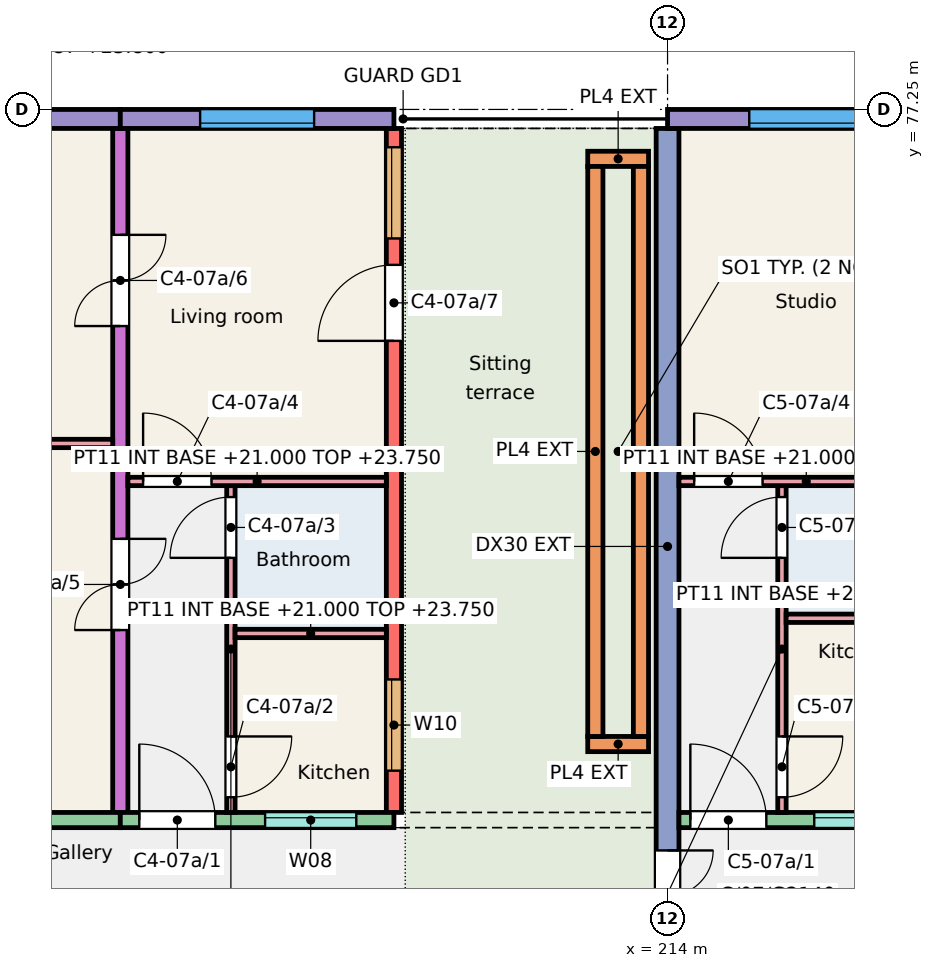
"""IFC4 building model, lengths in metres.
Left out: names, types, materials, properties, quantities, classifications, styles, units other than length and angle.
Written with IfcOpenShell. Run it as: python <this file> out.ifc"""

import sys

from ifc_helpers import new_model, si_unit, direction, frame, frame_2d, origin, place, context, subcontext, project, spatial, rectangle, extrude, element, fill, save


model = new_model("IFC4")
c1 = context("Model", 3, precision=1e-05, world=origin(), true_north=direction((0.0, 1.0)))
c2 = subcontext(c1, "Body", "Model", "MODEL_VIEW")
j1 = project(units=[si_unit("LENGTHUNIT", "METRE"), si_unit("PLANEANGLEUNIT", "RADIAN")], contexts=[c1])
p1 = place(None, origin())
s1 = spatial("IfcSite", under=j1, at=p1, CompositionType="ELEMENT")
p2 = place(p1, origin())
s2 = spatial("IfcBuilding", under=s1, at=p2, CompositionType="ELEMENT")
p3 = place(p2, frame((0.0, 0.0, 21.0)))
s3 = spatial("IfcBuildingStorey", under=s2, at=p3, CompositionType="ELEMENT", Elevation=21.0)
p4 = place(p3, frame((206.8, 68.0, 0.0), z_axis=(0.0, 0.0, 1.0), x_axis=(0.0, 1.0, 0.0)))
e1 = element("IfcWall", 1, at=p4, inside=s3, PredefinedType="SHEAR", context=c2, shape_type="SweptSolid", body=[
    extrude(rectangle(XDim=9.0, YDim=0.2, at=frame_2d((4.5, 0.0))), origin(), (0.0, 0.0, 1.0), 3.0),
])
p5 = place(p4, frame((2.4, 0.0, 0.0)))
e2 = element("IfcOpeningElement", 2, at=p5, cuts=e1, PredefinedType="OPENING", context=c2, shape_type="SweptSolid", body=[
    extrude(rectangle(XDim=1.2, YDim=2.1, at=frame_2d((0.6, 1.05))), frame((0.0, 0.11, 0.0), z_axis=(0.0, -1.0, 0.0), x_axis=(1.0, 0.0, 0.0)), (0.0, 0.0, 1.0), 0.22),
])
p6 = place(p4, frame((6.4, 0.0, 0.0)))
e3 = element("IfcOpeningElement", 3, at=p6, cuts=e1, PredefinedType="OPENING", context=c2, shape_type="SweptSolid", body=[
    extrude(rectangle(XDim=1.2, YDim=2.1, at=frame_2d((0.6, 1.05))), frame((0.0, 0.11, 0.0), z_axis=(0.0, -1.0, 0.0), x_axis=(1.0, 0.0, 0.0)), (0.0, 0.0, 1.0), 0.22),
])
p7 = place(p3, frame((210.4, 68.0, 0.0), z_axis=(0.0, 0.0, 1.0), x_axis=(0.0, 1.0, 0.0)))
e4 = element("IfcWall", 4, at=p7, inside=s3, PredefinedType="SHEAR", context=c2, shape_type="SweptSolid", body=[
    extrude(rectangle(XDim=9.0, YDim=0.2, at=frame_2d((4.5, 0.0))), origin(), (0.0, 0.0, 1.0), 3.0),
])
p8 = place(p7, frame((0.55, 0.0, 0.9)))
e5 = element("IfcOpeningElement", 5, at=p8, cuts=e4, PredefinedType="OPENING", context=c2, shape_type="SweptSolid", body=[
    extrude(rectangle(XDim=1.2, YDim=1.5, at=frame_2d((0.6, 0.75))), frame((0.0, 0.11, 0.0), z_axis=(0.0, -1.0, 0.0), x_axis=(1.0, 0.0, 0.0)), (0.0, 0.0, 1.0), 0.22),
])
p9 = place(p7, frame((7.552, 0.0, 0.9)))
e6 = element("IfcOpeningElement", 6, at=p9, cuts=e4, PredefinedType="OPENING", context=c2, shape_type="SweptSolid", body=[
    extrude(rectangle(XDim=1.2, YDim=1.5, at=frame_2d((0.6, 0.75))), frame((0.0, 0.11, 0.0), z_axis=(0.0, -1.0, 0.0), x_axis=(1.0, 0.0, 0.0)), (0.0, 0.0, 1.0), 0.22),
])
p10 = place(p7, frame((6.205, 0.0, 0.0)))
e7 = element("IfcOpeningElement", 7, at=p10, cuts=e4, PredefinedType="OPENING", context=c2, shape_type="SweptSolid", body=[
    extrude(rectangle(XDim=1.0, YDim=2.1, at=frame_2d((0.5, 1.05))), frame((0.0, 0.11, 0.0), z_axis=(0.0, -1.0, 0.0), x_axis=(1.0, 0.0, 0.0)), (0.0, 0.0, 1.0), 0.22),
])
p11 = place(p3, frame((214.0, 66.0, 0.0), z_axis=(0.0, 0.0, 1.0), x_axis=(0.0, 1.0, 0.0)))
e8 = element("IfcWall", 8, at=p11, inside=s3, PredefinedType="SHEAR", context=c2, shape_type="SweptSolid", body=[
    extrude(rectangle(XDim=11.0, YDim=0.3, at=frame_2d((5.5, 0.0))), origin(), (0.0, 0.0, 1.0), 3.0),
])
p12 = place(p11, frame((0.3, 0.0, 0.0)))
e9 = element("IfcOpeningElement", 9, at=p12, cuts=e8, PredefinedType="OPENING", context=c2, shape_type="SweptSolid", body=[
    extrude(rectangle(XDim=1.2, YDim=2.1, at=frame_2d((0.6, 1.05))), frame((0.0, 0.16, 0.0), z_axis=(0.0, -1.0, 0.0), x_axis=(1.0, 0.0, 0.0)), (0.0, 0.0, 1.0), 0.32),
])
p13 = place(p3, frame((203.2, 77.125, 0.0), z_axis=(0.0, 0.0, 1.0), x_axis=(1.0, 0.0, 0.0)))
e10 = element("IfcWall", 10, at=p13, inside=s3, PredefinedType="SOLIDWALL", context=c2, shape_type="SweptSolid", body=[
    extrude(rectangle(XDim=3.6, YDim=0.25, at=frame_2d((1.8, 0.0))), origin(), (0.0, 0.0, 1.0), 3.0),
])
p14 = place(p13, frame((1.062, 0.0, 0.9)))
e11 = element("IfcOpeningElement", 11, at=p14, cuts=e10, PredefinedType="OPENING", context=c2, shape_type="SweptSolid", body=[
    extrude(rectangle(XDim=1.5, YDim=1.5, at=frame_2d((0.75, 0.75))), frame((0.0, 0.135, 0.0), z_axis=(0.0, -1.0, 0.0), x_axis=(1.0, 0.0, 0.0)), (0.0, 0.0, 1.0), 0.27),
])
p15 = place(p3, frame((203.2, 67.9, 0.0), z_axis=(0.0, 0.0, 1.0), x_axis=(1.0, 0.0, 0.0)))
e12 = element("IfcWall", 12, at=p15, inside=s3, PredefinedType="SOLIDWALL", context=c2, shape_type="SweptSolid", body=[
    extrude(rectangle(XDim=3.6, YDim=0.2, at=frame_2d((1.8, 0.0))), origin(), (0.0, 0.0, 1.0), 3.0),
])
p16 = place(p15, frame((1.062, 0.0, 0.9)))
e13 = element("IfcOpeningElement", 13, at=p16, cuts=e12, PredefinedType="OPENING", context=c2, shape_type="SweptSolid", body=[
    extrude(rectangle(XDim=1.5, YDim=1.5, at=frame_2d((0.75, 0.75))), frame((0.0, 0.11, 0.0), z_axis=(0.0, -1.0, 0.0), x_axis=(1.0, 0.0, 0.0)), (0.0, 0.0, 1.0), 0.22),
])
p17 = place(p3, frame((206.8, 77.125, 0.0), z_axis=(0.0, 0.0, 1.0), x_axis=(1.0, 0.0, 0.0)))
e14 = element("IfcWall", 14, at=p17, inside=s3, PredefinedType="SOLIDWALL", context=c2, shape_type="SweptSolid", body=[
    extrude(rectangle(XDim=3.6, YDim=0.25, at=frame_2d((1.8, 0.0))), origin(), (0.0, 0.0, 1.0), 3.0),
])
p18 = place(p17, frame((1.05, 0.0, 0.9)))
e15 = element("IfcOpeningElement", 15, at=p18, cuts=e14, PredefinedType="OPENING", context=c2, shape_type="SweptSolid", body=[
    extrude(rectangle(XDim=1.5, YDim=1.5, at=frame_2d((0.75, 0.75))), frame((0.0, 0.135, 0.0), z_axis=(0.0, -1.0, 0.0), x_axis=(1.0, 0.0, 0.0)), (0.0, 0.0, 1.0), 0.27),
])
p19 = place(p3, frame((206.8, 67.9, 0.0), z_axis=(0.0, 0.0, 1.0), x_axis=(1.0, 0.0, 0.0)))
e16 = element("IfcWall", 16, at=p19, inside=s3, PredefinedType="SOLIDWALL", context=c2, shape_type="SweptSolid", body=[
    extrude(rectangle(XDim=3.6, YDim=0.2, at=frame_2d((1.8, 0.0))), origin(), (0.0, 0.0, 1.0), 3.0),
])
p20 = place(p19, frame((1.905, 0.0, 1.1)))
e17 = element("IfcOpeningElement", 17, at=p20, cuts=e16, PredefinedType="OPENING", context=c2, shape_type="SweptSolid", body=[
    extrude(rectangle(XDim=1.2, YDim=1.3, at=frame_2d((0.6, 0.65))), frame((0.0, 0.11, 0.0), z_axis=(0.0, -1.0, 0.0), x_axis=(1.0, 0.0, 0.0)), (0.0, 0.0, 1.0), 0.22),
])
p21 = place(p19, frame((0.25, 0.0, 0.0)))
e18 = element("IfcOpeningElement", 18, at=p21, cuts=e16, PredefinedType="OPENING", context=c2, shape_type="SweptSolid", body=[
    extrude(rectangle(XDim=1.0, YDim=2.1, at=frame_2d((0.5, 1.05))), frame((0.0, 0.11, 0.0), z_axis=(0.0, -1.0, 0.0), x_axis=(1.0, 0.0, 0.0)), (0.0, 0.0, 1.0), 0.22),
])
p22 = place(p3, frame((214.0, 77.125, 0.0), z_axis=(0.0, 0.0, 1.0), x_axis=(1.0, 0.0, 0.0)))
e19 = element("IfcWall", 19, at=p22, inside=s3, PredefinedType="SOLIDWALL", context=c2, shape_type="SweptSolid", body=[
    extrude(rectangle(XDim=3.6, YDim=0.25, at=frame_2d((1.8, 0.0))), origin(), (0.0, 0.0, 1.0), 3.0),
])
p23 = place(p22, frame((1.075, 0.0, 0.9)))
e20 = element("IfcOpeningElement", 20, at=p23, cuts=e19, PredefinedType="OPENING", context=c2, shape_type="SweptSolid", body=[
    extrude(rectangle(XDim=1.5, YDim=1.5, at=frame_2d((0.75, 0.75))), frame((0.0, 0.135, 0.0), z_axis=(0.0, -1.0, 0.0), x_axis=(1.0, 0.0, 0.0)), (0.0, 0.0, 1.0), 0.27),
])
p24 = place(p3, frame((214.15, 67.9, 0.0), z_axis=(0.0, 0.0, 1.0), x_axis=(1.0, 0.0, 0.0)))
e21 = element("IfcWall", 21, at=p24, inside=s3, PredefinedType="SOLIDWALL", context=c2, shape_type="SweptSolid", body=[
    extrude(rectangle(XDim=3.45, YDim=0.2, at=frame_2d((1.725, 0.0))), origin(), (0.0, 0.0, 1.0), 3.0),
])
p25 = place(p24, frame((1.78, 0.0, 1.1)))
e22 = element("IfcOpeningElement", 22, at=p25, cuts=e21, PredefinedType="OPENING", context=c2, shape_type="SweptSolid", body=[
    extrude(rectangle(XDim=1.2, YDim=1.3, at=frame_2d((0.6, 0.65))), frame((0.0, 0.11, 0.0), z_axis=(0.0, -1.0, 0.0), x_axis=(1.0, 0.0, 0.0)), (0.0, 0.0, 1.0), 0.22),
])
p26 = place(p24, frame((0.15, 0.0, 0.0)))
e23 = element("IfcOpeningElement", 23, at=p26, cuts=e21, PredefinedType="OPENING", context=c2, shape_type="SweptSolid", body=[
    extrude(rectangle(XDim=1.0, YDim=2.1, at=frame_2d((0.5, 1.05))), frame((0.0, 0.11, 0.0), z_axis=(0.0, -1.0, 0.0), x_axis=(1.0, 0.0, 0.0)), (0.0, 0.0, 1.0), 0.22),
])
for number, where, z_axis, x_axis in (
    (24, (212.95, 68.9, 0.01), (0.0, 0.0, 1.0), (1.0, 0.0, 0.0)),
    (25, (212.95, 76.6, 0.01), (0.0, 0.0, 1.0), (1.0, 0.0, 0.0)),
):
    element("IfcWall", number, at=place(p3, frame(where, z_axis=z_axis, x_axis=x_axis)), inside=s3, PredefinedType="SOLIDWALL", context=c2, shape_type="SweptSolid", body=[
        extrude(rectangle(XDim=0.8, YDim=0.2, at=frame_2d((0.4, 0.0))), origin(), (0.0, 0.0, 1.0), 0.45),
    ])
for number, where, z_axis, x_axis in (
    (26, (213.05, 69.0, 0.01), (0.0, 0.0, 1.0), (0.0, 1.0, 0.0)),
    (27, (213.65, 69.0, 0.01), (0.0, 0.0, 1.0), (0.0, 1.0, 0.0)),
):
    element("IfcWall", number, at=place(p3, frame(where, z_axis=z_axis, x_axis=x_axis)), inside=s3, PredefinedType="SOLIDWALL", context=c2, shape_type="SweptSolid", body=[
        extrude(rectangle(XDim=7.5, YDim=0.2, at=frame_2d((3.75, 0.0))), origin(), (0.0, 0.0, 1.0), 0.45),
    ])
p27 = place(p3, frame((208.255, 68.0, 0.0), z_axis=(0.0, 0.0, 1.0), x_axis=(0.0, 1.0, 0.0)))
e28 = element("IfcWall", 28, at=p27, inside=s3, PredefinedType="PARTITIONING", context=c2, shape_type="SweptSolid", body=[
    extrude(rectangle(XDim=4.3, YDim=0.11, at=frame_2d((2.15, 0.0))), origin(), (0.0, 0.0, 1.0), 2.75),
])
p28 = place(p27, frame((0.2, 0.0, 0.0)))
e29 = element("IfcOpeningElement", 29, at=p28, cuts=e28, PredefinedType="OPENING", context=c2, shape_type="SweptSolid", body=[
    extrude(rectangle(XDim=0.8, YDim=2.1, at=frame_2d((0.4, 1.05))), frame((0.0, 0.065, 0.0), z_axis=(0.0, -1.0, 0.0), x_axis=(1.0, 0.0, 0.0)), (0.0, 0.0, 1.0), 0.13),
])
p29 = place(p27, frame((3.35, 0.0, 0.0)))
e30 = element("IfcOpeningElement", 30, at=p29, cuts=e28, PredefinedType="OPENING", context=c2, shape_type="SweptSolid", body=[
    extrude(rectangle(XDim=0.8, YDim=2.1, at=frame_2d((0.4, 1.05))), frame((0.0, 0.065, 0.0), z_axis=(0.0, -1.0, 0.0), x_axis=(1.0, 0.0, 0.0)), (0.0, 0.0, 1.0), 0.13),
])
p30 = place(p3, frame((208.31, 70.355, 0.0), z_axis=(0.0, 0.0, 1.0), x_axis=(1.0, 0.0, 0.0)))
e31 = element("IfcWall", 31, at=p30, inside=s3, PredefinedType="PARTITIONING", context=c2, shape_type="SweptSolid", body=[
    extrude(rectangle(XDim=1.99, YDim=0.11, at=frame_2d((0.995, 0.0))), origin(), (0.0, 0.0, 1.0), 2.75),
])
p31 = place(p3, frame((206.9, 72.355, 0.0), z_axis=(0.0, 0.0, 1.0), x_axis=(1.0, 0.0, 0.0)))
e32 = element("IfcWall", 32, at=p31, inside=s3, PredefinedType="PARTITIONING", context=c2, shape_type="SweptSolid", body=[
    extrude(rectangle(XDim=3.4, YDim=0.11, at=frame_2d((1.7, 0.0))), origin(), (0.0, 0.0, 1.0), 2.75),
])
p32 = place(p31, frame((0.2, 0.0, 0.0)))
e33 = element("IfcOpeningElement", 33, at=p32, cuts=e32, PredefinedType="OPENING", context=c2, shape_type="SweptSolid", body=[
    extrude(rectangle(XDim=0.9, YDim=2.1, at=frame_2d((0.45, 1.05))), frame((0.0, 0.065, 0.0), z_axis=(0.0, -1.0, 0.0), x_axis=(1.0, 0.0, 0.0)), (0.0, 0.0, 1.0), 0.13),
])
p33 = place(p3, frame((203.325, 72.855, 0.0), z_axis=(0.0, 0.0, 1.0), x_axis=(1.0, 0.0, 0.0)))
e34 = element("IfcWall", 34, at=p33, inside=s3, PredefinedType="PARTITIONING", context=c2, shape_type="SweptSolid", body=[
    extrude(rectangle(XDim=3.375, YDim=0.11, at=frame_2d((1.688, 0.0))), origin(), (0.0, 0.0, 1.0), 2.8),
])
p34 = place(p3, frame((215.505, 68.0, 0.0), z_axis=(0.0, 0.0, 1.0), x_axis=(0.0, 1.0, 0.0)))
e35 = element("IfcWall", 35, at=p34, inside=s3, PredefinedType="PARTITIONING", context=c2, shape_type="SweptSolid", body=[
    extrude(rectangle(XDim=4.3, YDim=0.11, at=frame_2d((2.15, 0.0))), origin(), (0.0, 0.0, 1.0), 2.8),
])
p35 = place(p34, frame((0.2, 0.0, 0.0)))
e36 = element("IfcOpeningElement", 36, at=p35, cuts=e35, PredefinedType="OPENING", context=c2, shape_type="SweptSolid", body=[
    extrude(rectangle(XDim=0.8, YDim=2.1, at=frame_2d((0.4, 1.05))), frame((0.0, 0.065, 0.0), z_axis=(0.0, -1.0, 0.0), x_axis=(1.0, 0.0, 0.0)), (0.0, 0.0, 1.0), 0.13),
])
p36 = place(p34, frame((3.35, 0.0, 0.0)))
e37 = element("IfcOpeningElement", 37, at=p36, cuts=e35, PredefinedType="OPENING", context=c2, shape_type="SweptSolid", body=[
    extrude(rectangle(XDim=0.8, YDim=2.1, at=frame_2d((0.4, 1.05))), frame((0.0, 0.065, 0.0), z_axis=(0.0, -1.0, 0.0), x_axis=(1.0, 0.0, 0.0)), (0.0, 0.0, 1.0), 0.13),
])
p37 = place(p3, frame((215.56, 70.555, 0.0), z_axis=(0.0, 0.0, 1.0), x_axis=(1.0, 0.0, 0.0)))
e38 = element("IfcWall", 38, at=p37, inside=s3, PredefinedType="PARTITIONING", context=c2, shape_type="SweptSolid", body=[
    extrude(rectangle(XDim=1.94, YDim=0.11, at=frame_2d((0.97, 0.0))), origin(), (0.0, 0.0, 1.0), 2.8),
])
p38 = place(p3, frame((214.15, 72.355, 0.0), z_axis=(0.0, 0.0, 1.0), x_axis=(1.0, 0.0, 0.0)))
e39 = element("IfcWall", 39, at=p38, inside=s3, PredefinedType="PARTITIONING", context=c2, shape_type="SweptSolid", body=[
    extrude(rectangle(XDim=3.35, YDim=0.11, at=frame_2d((1.675, 0.0))), origin(), (0.0, 0.0, 1.0), 2.8),
])
p39 = place(p38, frame((0.2, 0.0, 0.0)))
e40 = element("IfcOpeningElement", 40, at=p39, cuts=e39, PredefinedType="OPENING", context=c2, shape_type="SweptSolid", body=[
    extrude(rectangle(XDim=0.9, YDim=2.1, at=frame_2d((0.45, 1.05))), frame((0.0, 0.065, 0.0), z_axis=(0.0, -1.0, 0.0), x_axis=(1.0, 0.0, 0.0)), (0.0, 0.0, 1.0), 0.13),
])
p40 = place(p20, origin())
e41 = element("IfcWindow", 41, at=p40, inside=s3, PartitioningType="SINGLE_PANEL", PredefinedType="WINDOW", context=c2, shape_type="SweptSolid", body=[
    extrude(rectangle(XDim=1.2, YDim=1.3, at=frame_2d((0.6, 0.65))), frame((0.0, 0.06, 0.0), z_axis=(0.0, -1.0, 0.0), x_axis=(1.0, 0.0, 0.0)), (0.0, 0.0, 1.0), 0.06),
])
fill(e17, e41)
p41 = place(p18, origin())
e42 = element("IfcWindow", 42, at=p41, inside=s3, PartitioningType="SINGLE_PANEL", PredefinedType="WINDOW", context=c2, shape_type="SweptSolid", body=[
    extrude(rectangle(XDim=1.5, YDim=1.5, at=frame_2d((0.75, 0.75))), frame((0.0, -0.025, 0.0), z_axis=(0.0, -1.0, 0.0), x_axis=(1.0, 0.0, 0.0)), (0.0, 0.0, 1.0), 0.06),
])
fill(e15, e42)
p42 = place(p8, origin())
e43 = element("IfcWindow", 43, at=p42, inside=s3, PartitioningType="SINGLE_PANEL", PredefinedType="WINDOW", context=c2, shape_type="SweptSolid", body=[
    extrude(rectangle(XDim=1.2, YDim=1.5, at=frame_2d((0.6, 0.75))), frame((0.0, 0.06, 0.0), z_axis=(0.0, -1.0, 0.0), x_axis=(1.0, 0.0, 0.0)), (0.0, 0.0, 1.0), 0.06),
])
fill(e5, e43)
p43 = place(p9, origin())
e44 = element("IfcWindow", 44, at=p43, inside=s3, PartitioningType="SINGLE_PANEL", PredefinedType="WINDOW", context=c2, shape_type="SweptSolid", body=[
    extrude(rectangle(XDim=1.2, YDim=1.5, at=frame_2d((0.6, 0.75))), frame((0.0, 0.06, 0.0), z_axis=(0.0, -1.0, 0.0), x_axis=(1.0, 0.0, 0.0)), (0.0, 0.0, 1.0), 0.06),
])
fill(e6, e44)
p44 = place(p25, origin())
e45 = element("IfcWindow", 45, at=p44, inside=s3, PartitioningType="SINGLE_PANEL", PredefinedType="WINDOW", context=c2, shape_type="SweptSolid", body=[
    extrude(rectangle(XDim=1.2, YDim=1.3, at=frame_2d((0.6, 0.65))), frame((0.0, 0.06, 0.0), z_axis=(0.0, -1.0, 0.0), x_axis=(1.0, 0.0, 0.0)), (0.0, 0.0, 1.0), 0.06),
])
fill(e22, e45)
p45 = place(p23, origin())
e46 = element("IfcWindow", 46, at=p45, inside=s3, PartitioningType="SINGLE_PANEL", PredefinedType="WINDOW", context=c2, shape_type="SweptSolid", body=[
    extrude(rectangle(XDim=1.5, YDim=1.5, at=frame_2d((0.75, 0.75))), frame((0.0, -0.025, 0.0), z_axis=(0.0, -1.0, 0.0), x_axis=(1.0, 0.0, 0.0)), (0.0, 0.0, 1.0), 0.06),
])
fill(e20, e46)
p46 = place(p21, origin())
e47 = element("IfcDoor", 47, at=p46, inside=s3, OperationType="SINGLE_SWING_LEFT", PredefinedType="DOOR", context=c2, shape_type="SweptSolid", body=[
    extrude(rectangle(XDim=1.0, YDim=2.1, at=frame_2d((0.5, 1.05))), frame((0.0, 0.025, 0.0), z_axis=(0.0, -1.0, 0.0), x_axis=(1.0, 0.0, 0.0)), (0.0, 0.0, 1.0), 0.05),
])
fill(e18, e47)
p47 = place(p28, origin())
e48 = element("IfcDoor", 48, at=p47, inside=s3, OperationType="SINGLE_SWING_RIGHT", PredefinedType="DOOR", context=c2, shape_type="SweptSolid", body=[
    extrude(rectangle(XDim=0.8, YDim=2.1, at=frame_2d((0.4, 1.05))), frame((0.0, 0.025, 0.0), z_axis=(0.0, -1.0, 0.0), x_axis=(1.0, 0.0, 0.0)), (0.0, 0.0, 1.0), 0.05),
])
fill(e29, e48)
p48 = place(p29, origin())
e49 = element("IfcDoor", 49, at=p48, inside=s3, OperationType="SINGLE_SWING_LEFT", PredefinedType="DOOR", context=c2, shape_type="SweptSolid", body=[
    extrude(rectangle(XDim=0.8, YDim=2.1, at=frame_2d((0.4, 1.05))), frame((0.0, 0.025, 0.0), z_axis=(0.0, -1.0, 0.0), x_axis=(1.0, 0.0, 0.0)), (0.0, 0.0, 1.0), 0.05),
])
fill(e30, e49)
p49 = place(p32, origin())
e50 = element("IfcDoor", 50, at=p49, inside=s3, OperationType="SINGLE_SWING_LEFT", PredefinedType="DOOR", context=c2, shape_type="SweptSolid", body=[
    extrude(rectangle(XDim=0.9, YDim=2.1, at=frame_2d((0.45, 1.05))), frame((0.0, 0.025, 0.0), z_axis=(0.0, -1.0, 0.0), x_axis=(1.0, 0.0, 0.0)), (0.0, 0.0, 1.0), 0.05),
])
fill(e33, e50)
p50 = place(p5, origin())
e51 = element("IfcDoor", 51, at=p50, inside=s3, OperationType="DOUBLE_DOOR_SINGLE_SWING", PredefinedType="DOOR", context=c2, shape_type="SweptSolid", body=[
    extrude(rectangle(XDim=1.2, YDim=2.1, at=frame_2d((0.6, 1.05))), frame((0.0, 0.025, 0.0), z_axis=(0.0, -1.0, 0.0), x_axis=(1.0, 0.0, 0.0)), (0.0, 0.0, 1.0), 0.05),
])
fill(e2, e51)
p51 = place(p6, origin())
e52 = element("IfcDoor", 52, at=p51, inside=s3, OperationType="DOUBLE_DOOR_SINGLE_SWING", PredefinedType="DOOR", context=c2, shape_type="SweptSolid", body=[
    extrude(rectangle(XDim=1.2, YDim=2.1, at=frame_2d((0.6, 1.05))), frame((0.0, 0.025, 0.0), z_axis=(0.0, -1.0, 0.0), x_axis=(1.0, 0.0, 0.0)), (0.0, 0.0, 1.0), 0.05),
])
fill(e3, e52)
p52 = place(p10, origin())
e53 = element("IfcDoor", 53, at=p52, inside=s3, OperationType="SINGLE_SWING_LEFT", PredefinedType="DOOR", context=c2, shape_type="SweptSolid", body=[
    extrude(rectangle(XDim=1.0, YDim=2.1, at=frame_2d((0.5, 1.05))), frame((0.0, 0.025, 0.0), z_axis=(0.0, -1.0, 0.0), x_axis=(1.0, 0.0, 0.0)), (0.0, 0.0, 1.0), 0.05),
])
fill(e7, e53)
p53 = place(p26, origin())
e54 = element("IfcDoor", 54, at=p53, inside=s3, OperationType="SINGLE_SWING_LEFT", PredefinedType="DOOR", context=c2, shape_type="SweptSolid", body=[
    extrude(rectangle(XDim=1.0, YDim=2.1, at=frame_2d((0.5, 1.05))), frame((0.0, 0.025, 0.0), z_axis=(0.0, -1.0, 0.0), x_axis=(1.0, 0.0, 0.0)), (0.0, 0.0, 1.0), 0.05),
])
fill(e23, e54)
p54 = place(p35, origin())
e55 = element("IfcDoor", 55, at=p54, inside=s3, OperationType="SINGLE_SWING_RIGHT", PredefinedType="DOOR", context=c2, shape_type="SweptSolid", body=[
    extrude(rectangle(XDim=0.8, YDim=2.1, at=frame_2d((0.4, 1.05))), frame((0.0, 0.025, 0.0), z_axis=(0.0, -1.0, 0.0), x_axis=(1.0, 0.0, 0.0)), (0.0, 0.0, 1.0), 0.05),
])
fill(e36, e55)
p55 = place(p36, origin())
e56 = element("IfcDoor", 56, at=p55, inside=s3, OperationType="SINGLE_SWING_LEFT", PredefinedType="DOOR", context=c2, shape_type="SweptSolid", body=[
    extrude(rectangle(XDim=0.8, YDim=2.1, at=frame_2d((0.4, 1.05))), frame((0.0, 0.025, 0.0), z_axis=(0.0, -1.0, 0.0), x_axis=(1.0, 0.0, 0.0)), (0.0, 0.0, 1.0), 0.05),
])
fill(e37, e56)
p56 = place(p39, origin())
e57 = element("IfcDoor", 57, at=p56, inside=s3, OperationType="SINGLE_SWING_LEFT", PredefinedType="DOOR", context=c2, shape_type="SweptSolid", body=[
    extrude(rectangle(XDim=0.9, YDim=2.1, at=frame_2d((0.45, 1.05))), frame((0.0, 0.025, 0.0), z_axis=(0.0, -1.0, 0.0), x_axis=(1.0, 0.0, 0.0)), (0.0, 0.0, 1.0), 0.05),
])
fill(e40, e57)
p57 = place(p12, origin())
e58 = element("IfcDoor", 58, at=p57, inside=s3, OperationType="DOUBLE_DOOR_SINGLE_SWING", PredefinedType="DOOR", context=c2, shape_type="SweptSolid", body=[
    extrude(rectangle(XDim=1.2, YDim=2.1, at=frame_2d((0.6, 1.05))), frame((0.0, 0.025, 0.0), z_axis=(0.0, -1.0, 0.0), x_axis=(1.0, 0.0, 0.0)), (0.0, 0.0, 1.0), 0.05),
])
fill(e9, e58)
save(model, sys.argv[1])
